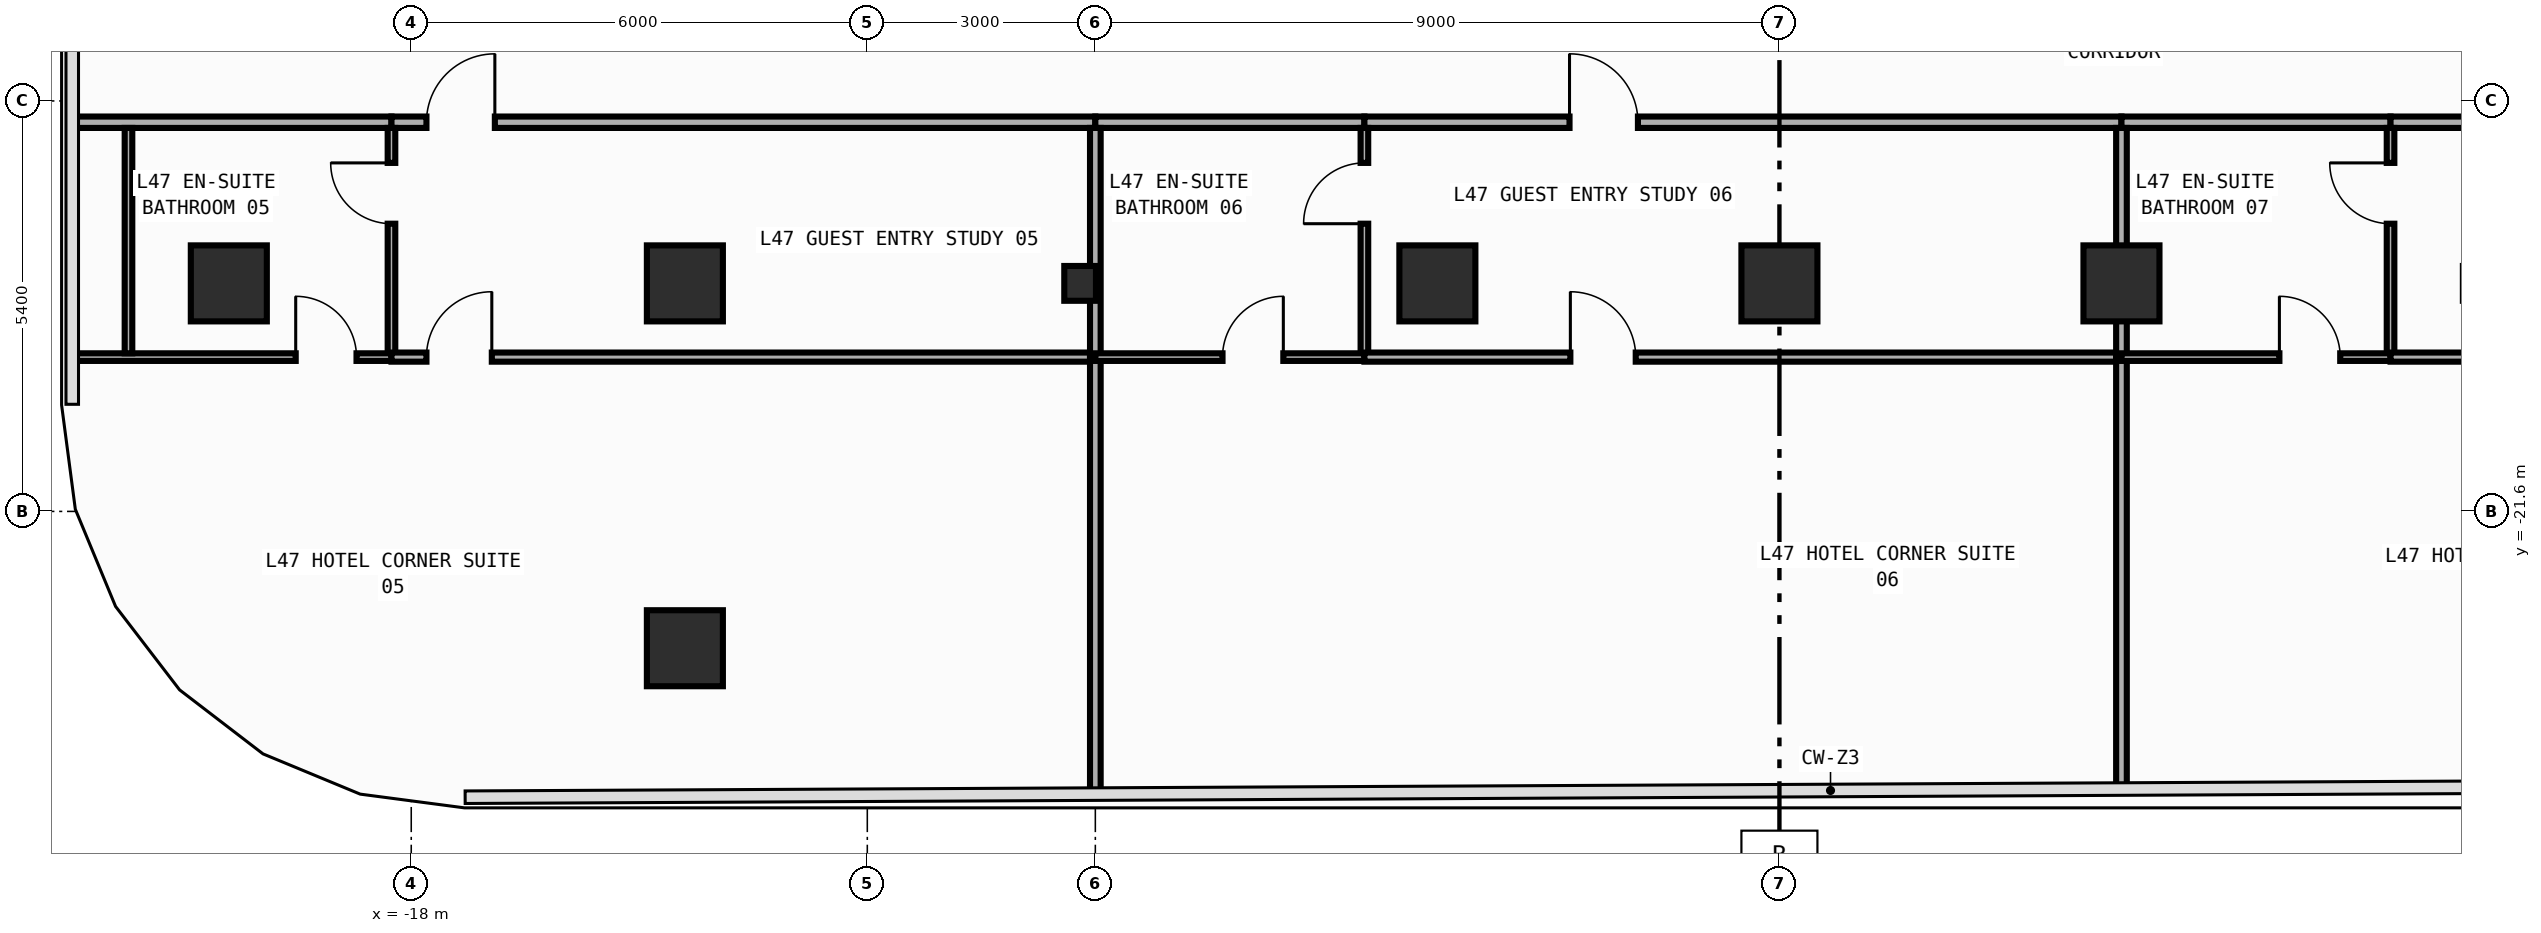
"""IFC4 building model, lengths in metres.
Left out: names, types, materials, properties, quantities, classifications, styles, units other than length and angle.
Written with IfcOpenShell. Run it as: python <this file> out.ifc"""

import sys

from ifc_helpers import new_model, si_unit, direction, frame, frame_2d, origin, origin_2d, place, context, subcontext, project, spatial, rectangle, i_section, extrude, element, fill, save


model = new_model("IFC4")
c1 = context("Model", 3, precision=1e-05, world=origin(), true_north=direction((0.0, 1.0)))
c2 = subcontext(c1, "Body", "Model", "MODEL_VIEW")
j1 = project(units=[si_unit("LENGTHUNIT", "METRE"), si_unit("PLANEANGLEUNIT", "RADIAN")], contexts=[c1])
p1 = place(None, origin())
s1 = spatial("IfcSite", under=j1, at=p1, CompositionType="ELEMENT")
p2 = place(p1, origin())
s2 = spatial("IfcBuilding", under=s1, at=p2, CompositionType="ELEMENT")
p3 = place(p2, frame((0.0, 0.0, 203.0)))
s3 = spatial("IfcBuildingStorey", under=s2, at=p3, CompositionType="ELEMENT", Elevation=203.0)
p4 = place(p3, frame((-9.2, -18.6, 0.0), z_axis=(0.0, 0.0, 1.0), x_axis=(1.0, 0.0, 0.0)))
e1 = element("IfcColumn", 1, at=p4, inside=s3, PredefinedType="COLUMN", context=c2, shape_type="SweptSolid", body=[
    extrude(i_section(OverallWidth=0.417, OverallDepth=0.458, WebThickness=0.03, FlangeThickness=0.05, FilletRadius=0.022, at=origin_2d()), origin(), (0.0, 0.0, 1.0), 3.8),
])
for number, where, z_axis, x_axis in (
    (2, (-20.4, -18.6, 0.0), (0.0, 0.0, 1.0), (1.0, 0.0, 0.0)),
    (3, (-14.4, -18.6, 0.0), (0.0, 0.0, 1.0), (1.0, 0.0, 0.0)),
    (4, (-4.5, -18.6, 0.0), (0.0, 0.0, 1.0), (1.0, 0.0, 0.0)),
    (5, (0.0, -18.6, 0.0), (0.0, 0.0, 1.0), (1.0, 0.0, 0.0)),
    (6, (4.5, -18.6, 0.0), (0.0, 0.0, 1.0), (1.0, 0.0, 0.0)),
    (7, (-14.4, -23.4, 0.0), (0.0, 0.0, 1.0), (1.0, 0.0, 0.0)),
):
    element("IfcColumn", number, at=place(p3, frame(where, z_axis=z_axis, x_axis=x_axis)), inside=s3, PredefinedType="COLUMN", context=c2, shape_type="SweptSolid", body=[
        extrude(rectangle(XDim=1.0, YDim=1.0, at=origin_2d()), origin(), (0.0, 0.0, 1.0), 3.8),
    ])
p5 = place(p3, frame((-22.455, -16.48, 0.0), z_axis=(0.0, 0.0, 1.0), x_axis=(1.0, 0.0, 0.0)))
e8 = element("IfcWall", 8, at=p5, inside=s3, PredefinedType="PARTITIONING", context=c2, shape_type="SweptSolid", body=[
    extrude(rectangle(XDim=4.195, YDim=0.15, at=frame_2d((2.098, 0.0))), origin(), (0.0, 0.0, 1.0), 3.54),
])
p6 = place(p3, frame((-18.26, -16.48, 0.0), z_axis=(0.0, 0.0, 1.0), x_axis=(1.0, 0.0, 0.0)))
e9 = element("IfcWall", 9, at=p6, inside=s3, PredefinedType="PARTITIONING", context=c2, shape_type="SweptSolid", body=[
    extrude(rectangle(XDim=9.26, YDim=0.15, at=frame_2d((4.63, 0.0))), origin(), (0.0, 0.0, 1.0), 3.54),
])
p7 = place(p6, frame((0.46, 0.0, 0.0)))
e10 = element("IfcOpeningElement", 10, at=p7, cuts=e9, PredefinedType="OPENING", context=c2, shape_type="SweptSolid", body=[
    extrude(rectangle(XDim=0.9, YDim=2.15, at=frame_2d((0.45, 1.075))), frame((0.0, 0.085, 0.0), z_axis=(0.0, -1.0, 0.0), x_axis=(1.0, 0.0, 0.0)), (0.0, 0.0, 1.0), 0.17),
])
p8 = place(p3, frame((-9.0, -16.48, 0.0), z_axis=(0.0, 0.0, 1.0), x_axis=(1.0, 0.0, 0.0)))
e11 = element("IfcWall", 11, at=p8, inside=s3, PredefinedType="PARTITIONING", context=c2, shape_type="SweptSolid", body=[
    extrude(rectangle(XDim=3.54, YDim=0.15, at=frame_2d((1.77, 0.0))), origin(), (0.0, 0.0, 1.0), 3.54),
])
p9 = place(p3, frame((-5.46, -16.48, 0.0), z_axis=(0.0, 0.0, 1.0), x_axis=(1.0, 0.0, 0.0)))
e12 = element("IfcWall", 12, at=p9, inside=s3, PredefinedType="PARTITIONING", context=c2, shape_type="SweptSolid", body=[
    extrude(rectangle(XDim=9.96, YDim=0.15, at=frame_2d((4.98, 0.0))), origin(), (0.0, 0.0, 1.0), 3.54),
])
p10 = place(p9, frame((2.698, 0.0, 0.0)))
e13 = element("IfcOpeningElement", 13, at=p10, cuts=e12, PredefinedType="OPENING", context=c2, shape_type="SweptSolid", body=[
    extrude(rectangle(XDim=0.9, YDim=2.15, at=frame_2d((0.45, 1.075))), frame((0.0, 0.085, 0.0), z_axis=(0.0, -1.0, 0.0), x_axis=(1.0, 0.0, 0.0)), (0.0, 0.0, 1.0), 0.17),
])
p11 = place(p3, frame((4.5, -16.48, 0.0), z_axis=(0.0, 0.0, 1.0), x_axis=(1.0, 0.0, 0.0)))
e14 = element("IfcWall", 14, at=p11, inside=s3, PredefinedType="PARTITIONING", context=c2, shape_type="SweptSolid", body=[
    extrude(rectangle(XDim=3.54, YDim=0.15, at=frame_2d((1.77, 0.0))), origin(), (0.0, 0.0, 1.0), 3.54),
])
p12 = place(p3, frame((8.04, -16.48, 0.0), z_axis=(0.0, 0.0, 1.0), x_axis=(1.0, 0.0, 0.0)))
e15 = element("IfcWall", 15, at=p12, inside=s3, PredefinedType="PARTITIONING", context=c2, shape_type="SweptSolid", body=[
    extrude(rectangle(XDim=4.2, YDim=0.15, at=frame_2d((2.1, 0.0))), origin(), (0.0, 0.0, 1.0), 3.54),
])
p13 = place(p12, frame((2.624, 0.0, 0.0)))
e16 = element("IfcOpeningElement", 16, at=p13, cuts=e15, PredefinedType="OPENING", context=c2, shape_type="SweptSolid", body=[
    extrude(rectangle(XDim=0.9, YDim=2.15, at=frame_2d((0.45, 1.075))), frame((0.0, 0.085, 0.0), z_axis=(0.0, -1.0, 0.0), x_axis=(1.0, 0.0, 0.0)), (0.0, 0.0, 1.0), 0.17),
])
p14 = place(p3, frame((-18.26, -19.52, 0.0), z_axis=(0.0, 0.0, 1.0), x_axis=(0.0, 1.0, 0.0)))
e17 = element("IfcWall", 17, at=p14, inside=s3, PredefinedType="PARTITIONING", context=c2, shape_type="SweptSolid", body=[
    extrude(rectangle(XDim=2.965, YDim=0.1, at=frame_2d((1.482, 0.0))), origin(), (0.0, 0.0, 1.0), 3.54),
])
p15 = place(p14, frame((1.705, 0.0, 0.0)))
e18 = element("IfcOpeningElement", 18, at=p15, cuts=e17, PredefinedType="OPENING", context=c2, shape_type="SweptSolid", body=[
    extrude(rectangle(XDim=0.8, YDim=2.1, at=frame_2d((0.4, 1.05))), frame((0.0, 0.06, 0.0), z_axis=(0.0, -1.0, 0.0), x_axis=(1.0, 0.0, 0.0)), (0.0, 0.0, 1.0), 0.12),
])
p16 = place(p3, frame((-22.455, -19.57, 0.0), z_axis=(0.0, 0.0, 1.0), x_axis=(1.0, 0.0, 0.0)))
e19 = element("IfcWall", 19, at=p16, inside=s3, PredefinedType="PARTITIONING", context=c2, shape_type="SweptSolid", body=[
    extrude(rectangle(XDim=4.195, YDim=0.1, at=frame_2d((2.098, 0.0))), origin(), (0.0, 0.0, 1.0), 3.54),
])
p17 = place(p16, frame((2.935, 0.0, 0.0)))
e20 = element("IfcOpeningElement", 20, at=p17, cuts=e19, PredefinedType="OPENING", context=c2, shape_type="SweptSolid", body=[
    extrude(rectangle(XDim=0.8, YDim=2.1, at=frame_2d((0.4, 1.05))), frame((0.0, 0.06, 0.0), z_axis=(0.0, -1.0, 0.0), x_axis=(1.0, 0.0, 0.0)), (0.0, 0.0, 1.0), 0.12),
])
p18 = place(p3, frame((-18.26, -19.57, 0.0), z_axis=(0.0, 0.0, 1.0), x_axis=(1.0, 0.0, 0.0)))
e21 = element("IfcWall", 21, at=p18, inside=s3, PredefinedType="PARTITIONING", context=c2, shape_type="SweptSolid", body=[
    extrude(rectangle(XDim=9.26, YDim=0.12, at=frame_2d((4.63, 0.0))), origin(), (0.0, 0.0, 1.0), 3.54),
])
p19 = place(p18, frame((0.46, 0.0, 0.0)))
e22 = element("IfcOpeningElement", 22, at=p19, cuts=e21, PredefinedType="OPENING", context=c2, shape_type="SweptSolid", body=[
    extrude(rectangle(XDim=0.86, YDim=2.15, at=frame_2d((0.43, 1.075))), frame((0.0, 0.07, 0.0), z_axis=(0.0, -1.0, 0.0), x_axis=(1.0, 0.0, 0.0)), (0.0, 0.0, 1.0), 0.14),
])
p20 = place(p3, frame((-9.0, -19.57, 0.0), z_axis=(0.0, 0.0, 1.0), x_axis=(0.0, 1.0, 0.0)))
e23 = element("IfcWall", 23, at=p20, inside=s3, PredefinedType="PARTITIONING", context=c2, shape_type="SweptSolid", body=[
    extrude(rectangle(XDim=3.015, YDim=0.14, at=frame_2d((1.508, 0.0))), origin(), (0.0, 0.0, 1.0), 2.952),
])
p21 = place(p3, frame((-9.0, -25.314, 0.0), z_axis=(0.0, 0.0, 1.0), x_axis=(0.0, 1.0, 0.0)))
e24 = element("IfcWall", 24, at=p21, inside=s3, PredefinedType="PARTITIONING", context=c2, shape_type="SweptSolid", body=[
    extrude(rectangle(XDim=5.744, YDim=0.14, at=frame_2d((2.872, 0.0))), origin(), (0.0, 0.0, 1.0), 3.54),
])
p22 = place(p3, frame((-5.46, -19.52, 0.0), z_axis=(0.0, 0.0, 1.0), x_axis=(0.0, 1.0, 0.0)))
e25 = element("IfcWall", 25, at=p22, inside=s3, PredefinedType="PARTITIONING", context=c2, shape_type="SweptSolid", body=[
    extrude(rectangle(XDim=2.965, YDim=0.1, at=frame_2d((1.482, 0.0))), origin(), (0.0, 0.0, 1.0), 3.54),
])
p23 = place(p22, frame((1.705, 0.0, 0.0)))
e26 = element("IfcOpeningElement", 26, at=p23, cuts=e25, PredefinedType="OPENING", context=c2, shape_type="SweptSolid", body=[
    extrude(rectangle(XDim=0.8, YDim=2.1, at=frame_2d((0.4, 1.05))), frame((0.0, 0.06, 0.0), z_axis=(0.0, -1.0, 0.0), x_axis=(1.0, 0.0, 0.0)), (0.0, 0.0, 1.0), 0.12),
])
p24 = place(p3, frame((-9.0, -19.57, 0.0), z_axis=(0.0, 0.0, 1.0), x_axis=(1.0, 0.0, 0.0)))
e27 = element("IfcWall", 27, at=p24, inside=s3, PredefinedType="PARTITIONING", context=c2, shape_type="SweptSolid", body=[
    extrude(rectangle(XDim=3.54, YDim=0.1, at=frame_2d((1.77, 0.0))), origin(), (0.0, 0.0, 1.0), 3.54),
])
p25 = place(p24, frame((1.673, 0.0, 0.0)))
e28 = element("IfcOpeningElement", 28, at=p25, cuts=e27, PredefinedType="OPENING", context=c2, shape_type="SweptSolid", body=[
    extrude(rectangle(XDim=0.8, YDim=2.1, at=frame_2d((0.4, 1.05))), frame((0.0, 0.06, 0.0), z_axis=(0.0, -1.0, 0.0), x_axis=(1.0, 0.0, 0.0)), (0.0, 0.0, 1.0), 0.12),
])
p26 = place(p3, frame((-5.46, -19.57, 0.0), z_axis=(0.0, 0.0, 1.0), x_axis=(1.0, 0.0, 0.0)))
e29 = element("IfcWall", 29, at=p26, inside=s3, PredefinedType="PARTITIONING", context=c2, shape_type="SweptSolid", body=[
    extrude(rectangle(XDim=9.96, YDim=0.12, at=frame_2d((4.98, 0.0))), origin(), (0.0, 0.0, 1.0), 3.54),
])
p27 = place(p26, frame((2.709, 0.0, 0.0)))
e30 = element("IfcOpeningElement", 30, at=p27, cuts=e29, PredefinedType="OPENING", context=c2, shape_type="SweptSolid", body=[
    extrude(rectangle(XDim=0.86, YDim=2.15, at=frame_2d((0.43, 1.075))), frame((0.0, 0.07, 0.0), z_axis=(0.0, -1.0, 0.0), x_axis=(1.0, 0.0, 0.0)), (0.0, 0.0, 1.0), 0.14),
])
p28 = place(p3, frame((4.5, -19.57, 0.0), z_axis=(0.0, 0.0, 1.0), x_axis=(0.0, 1.0, 0.0)))
e31 = element("IfcWall", 31, at=p28, inside=s3, PredefinedType="PARTITIONING", context=c2, shape_type="SweptSolid", body=[
    extrude(rectangle(XDim=3.015, YDim=0.14, at=frame_2d((1.508, 0.0))), origin(), (0.0, 0.0, 1.0), 3.54),
])
p29 = place(p3, frame((4.5, -25.248, 0.0), z_axis=(0.0, 0.0, 1.0), x_axis=(0.0, 1.0, 0.0)))
e32 = element("IfcWall", 32, at=p29, inside=s3, PredefinedType="PARTITIONING", context=c2, shape_type="SweptSolid", body=[
    extrude(rectangle(XDim=5.677, YDim=0.14, at=frame_2d((2.839, 0.0))), origin(), (0.0, 0.0, 1.0), 3.54),
])
p30 = place(p3, frame((8.04, -19.52, 0.0), z_axis=(0.0, 0.0, 1.0), x_axis=(0.0, 1.0, 0.0)))
e33 = element("IfcWall", 33, at=p30, inside=s3, PredefinedType="PARTITIONING", context=c2, shape_type="SweptSolid", body=[
    extrude(rectangle(XDim=2.965, YDim=0.1, at=frame_2d((1.482, 0.0))), origin(), (0.0, 0.0, 1.0), 3.54),
])
p31 = place(p30, frame((1.705, 0.0, 0.0)))
e34 = element("IfcOpeningElement", 34, at=p31, cuts=e33, PredefinedType="OPENING", context=c2, shape_type="SweptSolid", body=[
    extrude(rectangle(XDim=0.8, YDim=2.1, at=frame_2d((0.4, 1.05))), frame((0.0, 0.06, 0.0), z_axis=(0.0, -1.0, 0.0), x_axis=(1.0, 0.0, 0.0)), (0.0, 0.0, 1.0), 0.12),
])
p32 = place(p3, frame((4.5, -19.57, 0.0), z_axis=(0.0, 0.0, 1.0), x_axis=(1.0, 0.0, 0.0)))
e35 = element("IfcWall", 35, at=p32, inside=s3, PredefinedType="PARTITIONING", context=c2, shape_type="SweptSolid", body=[
    extrude(rectangle(XDim=3.54, YDim=0.1, at=frame_2d((1.77, 0.0))), origin(), (0.0, 0.0, 1.0), 3.54),
])
p33 = place(p32, frame((2.078, 0.0, 0.0)))
e36 = element("IfcOpeningElement", 36, at=p33, cuts=e35, PredefinedType="OPENING", context=c2, shape_type="SweptSolid", body=[
    extrude(rectangle(XDim=0.8, YDim=2.1, at=frame_2d((0.4, 1.05))), frame((0.0, 0.06, 0.0), z_axis=(0.0, -1.0, 0.0), x_axis=(1.0, 0.0, 0.0)), (0.0, 0.0, 1.0), 0.12),
])
p34 = place(p3, frame((8.04, -19.57, 0.0), z_axis=(0.0, 0.0, 1.0), x_axis=(1.0, 0.0, 0.0)))
e37 = element("IfcWall", 37, at=p34, inside=s3, PredefinedType="PARTITIONING", context=c2, shape_type="SweptSolid", body=[
    extrude(rectangle(XDim=4.2, YDim=0.12, at=frame_2d((2.1, 0.0))), origin(), (0.0, 0.0, 1.0), 3.54),
])
p35 = place(p34, frame((2.678, 0.0, 0.0)))
e38 = element("IfcOpeningElement", 38, at=p35, cuts=e37, PredefinedType="OPENING", context=c2, shape_type="SweptSolid", body=[
    extrude(rectangle(XDim=0.86, YDim=2.15, at=frame_2d((0.43, 1.075))), frame((0.0, 0.07, 0.0), z_axis=(0.0, -1.0, 0.0), x_axis=(1.0, 0.0, 0.0)), (0.0, 0.0, 1.0), 0.14),
])
p36 = place(p3, frame((-21.72, -19.52, 0.0), z_axis=(0.0, 0.0, 1.0), x_axis=(0.0, 1.0, 0.0)))
e39 = element("IfcWall", 39, at=p36, inside=s3, PredefinedType="PARTITIONING", context=c2, shape_type="SweptSolid", body=[
    extrude(rectangle(XDim=2.965, YDim=0.1, at=frame_2d((1.482, 0.0))), origin(), (0.0, 0.0, 1.0), 3.54),
])
p37 = place(p7, origin())
e40 = element("IfcDoor", 40, at=p37, inside=s3, OperationType="SINGLE_SWING_RIGHT", PredefinedType="DOOR", context=c2, shape_type="SweptSolid", body=[
    extrude(rectangle(XDim=0.9, YDim=2.15, at=frame_2d((0.45, 1.075))), frame((0.0, 0.025, 0.0), z_axis=(0.0, -1.0, 0.0), x_axis=(1.0, 0.0, 0.0)), (0.0, 0.0, 1.0), 0.05),
])
fill(e10, e40)
p38 = place(p10, origin())
e41 = element("IfcDoor", 41, at=p38, inside=s3, OperationType="SINGLE_SWING_LEFT", PredefinedType="DOOR", context=c2, shape_type="SweptSolid", body=[
    extrude(rectangle(XDim=0.9, YDim=2.15, at=frame_2d((0.45, 1.075))), frame((0.0, 0.025, 0.0), z_axis=(0.0, -1.0, 0.0), x_axis=(1.0, 0.0, 0.0)), (0.0, 0.0, 1.0), 0.05),
])
fill(e13, e41)
p39 = place(p15, origin())
e42 = element("IfcDoor", 42, at=p39, inside=s3, OperationType="SINGLE_SWING_RIGHT", PredefinedType="DOOR", context=c2, shape_type="SweptSolid", body=[
    extrude(rectangle(XDim=0.8, YDim=2.1, at=frame_2d((0.4, 1.05))), frame((0.0, 0.025, 0.0), z_axis=(0.0, -1.0, 0.0), x_axis=(1.0, 0.0, 0.0)), (0.0, 0.0, 1.0), 0.05),
])
fill(e18, e42)
p40 = place(p17, origin())
e43 = element("IfcDoor", 43, at=p40, inside=s3, OperationType="SINGLE_SWING_LEFT", PredefinedType="DOOR", context=c2, shape_type="SweptSolid", body=[
    extrude(rectangle(XDim=0.8, YDim=2.1, at=frame_2d((0.4, 1.05))), frame((0.0, 0.025, 0.0), z_axis=(0.0, -1.0, 0.0), x_axis=(1.0, 0.0, 0.0)), (0.0, 0.0, 1.0), 0.05),
])
fill(e20, e43)
p41 = place(p19, origin())
e44 = element("IfcDoor", 44, at=p41, inside=s3, OperationType="SINGLE_SWING_RIGHT", PredefinedType="DOOR", context=c2, shape_type="SweptSolid", body=[
    extrude(rectangle(XDim=0.86, YDim=2.15, at=frame_2d((0.43, 1.075))), frame((0.0, 0.025, 0.0), z_axis=(0.0, -1.0, 0.0), x_axis=(1.0, 0.0, 0.0)), (0.0, 0.0, 1.0), 0.05),
])
fill(e22, e44)
p42 = place(p23, origin())
e45 = element("IfcDoor", 45, at=p42, inside=s3, OperationType="SINGLE_SWING_LEFT", PredefinedType="DOOR", context=c2, shape_type="SweptSolid", body=[
    extrude(rectangle(XDim=0.8, YDim=2.1, at=frame_2d((0.4, 1.05))), frame((0.0, 0.025, 0.0), z_axis=(0.0, -1.0, 0.0), x_axis=(1.0, 0.0, 0.0)), (0.0, 0.0, 1.0), 0.05),
])
fill(e26, e45)
p43 = place(p25, origin())
e46 = element("IfcDoor", 46, at=p43, inside=s3, OperationType="SINGLE_SWING_RIGHT", PredefinedType="DOOR", context=c2, shape_type="SweptSolid", body=[
    extrude(rectangle(XDim=0.8, YDim=2.1, at=frame_2d((0.4, 1.05))), frame((0.0, 0.025, 0.0), z_axis=(0.0, -1.0, 0.0), x_axis=(1.0, 0.0, 0.0)), (0.0, 0.0, 1.0), 0.05),
])
fill(e28, e46)
p44 = place(p27, origin())
e47 = element("IfcDoor", 47, at=p44, inside=s3, OperationType="SINGLE_SWING_LEFT", PredefinedType="DOOR", context=c2, shape_type="SweptSolid", body=[
    extrude(rectangle(XDim=0.86, YDim=2.15, at=frame_2d((0.43, 1.075))), frame((0.0, 0.025, 0.0), z_axis=(0.0, -1.0, 0.0), x_axis=(1.0, 0.0, 0.0)), (0.0, 0.0, 1.0), 0.05),
])
fill(e30, e47)
p45 = place(p31, origin())
e48 = element("IfcDoor", 48, at=p45, inside=s3, OperationType="SINGLE_SWING_RIGHT", PredefinedType="DOOR", context=c2, shape_type="SweptSolid", body=[
    extrude(rectangle(XDim=0.8, YDim=2.1, at=frame_2d((0.4, 1.05))), frame((0.0, 0.025, 0.0), z_axis=(0.0, -1.0, 0.0), x_axis=(1.0, 0.0, 0.0)), (0.0, 0.0, 1.0), 0.05),
])
fill(e34, e48)
p46 = place(p33, origin())
e49 = element("IfcDoor", 49, at=p46, inside=s3, OperationType="SINGLE_SWING_LEFT", PredefinedType="DOOR", context=c2, shape_type="SweptSolid", body=[
    extrude(rectangle(XDim=0.8, YDim=2.1, at=frame_2d((0.4, 1.05))), frame((0.0, 0.025, 0.0), z_axis=(0.0, -1.0, 0.0), x_axis=(1.0, 0.0, 0.0)), (0.0, 0.0, 1.0), 0.05),
])
fill(e36, e49)
save(model, sys.argv[1])
